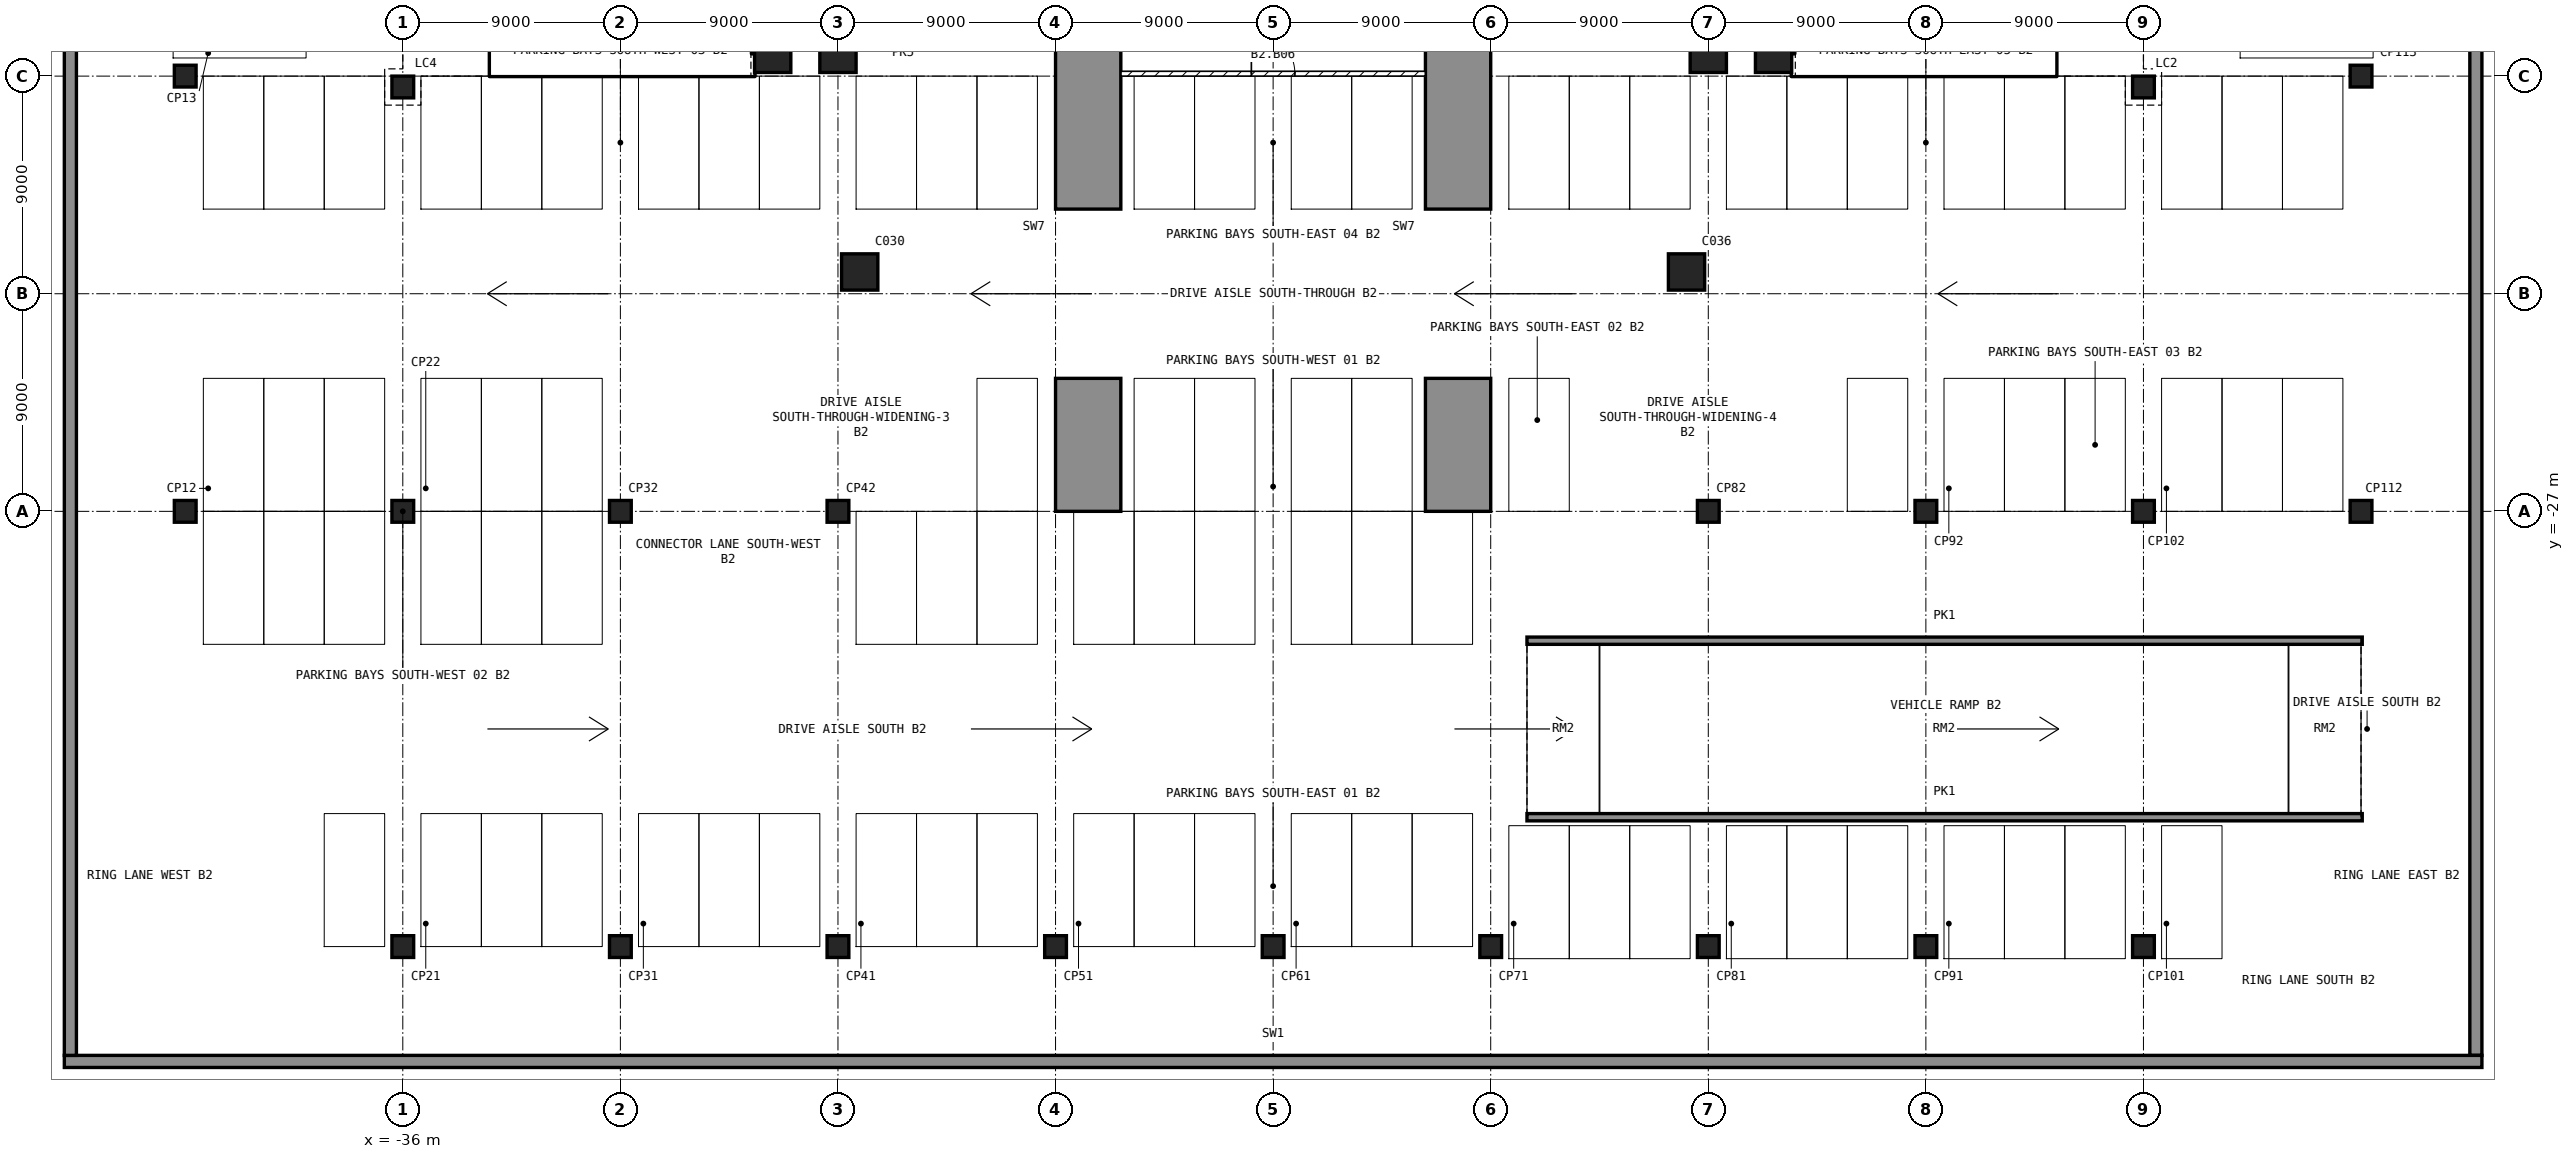
"""IFC4 building model, lengths in metres.
Left out: names, types, materials, properties, quantities, classifications, styles, units other than length and angle.
Written with IfcOpenShell. Run it as: python <this file> out.ifc"""

import sys

from ifc_helpers import new_model, si_unit, direction, frame, frame_2d, origin, origin_2d, place, context, subcontext, project, spatial, polyline, rectangle, outline, extrude, element, fill, save


model = new_model("IFC4")
c1 = context("Model", 3, precision=1e-05, world=origin(), true_north=direction((0.0, 1.0)))
c2 = subcontext(c1, "Body", "Model", "MODEL_VIEW")
j1 = project(units=[si_unit("LENGTHUNIT", "METRE"), si_unit("PLANEANGLEUNIT", "RADIAN")], contexts=[c1])
p1 = place(None, origin())
s1 = spatial("IfcSite", under=j1, at=p1, CompositionType="ELEMENT")
p2 = place(p1, origin())
s2 = spatial("IfcBuilding", under=s1, at=p2, CompositionType="ELEMENT")
p3 = place(p2, frame((0.0, 0.0, -8.7)))
s3 = spatial("IfcBuildingStorey", under=s2, at=p3, CompositionType="ELEMENT", Elevation=-8.7)
p4 = place(p3, frame((-50.0, -49.75, -0.3), z_axis=(0.0, 0.0, 1.0), x_axis=(1.0, 0.0, 0.0)))
e1 = element("IfcWall", 1, at=p4, inside=s3, PredefinedType="SOLIDWALL", context=c2, shape_type="SweptSolid", body=[
    extrude(rectangle(XDim=100.0, YDim=0.5, at=frame_2d((50.0, 0.0))), origin(), (0.0, 0.0, 1.0), 4.2),
])
for number, where, z_axis, x_axis in (
    (2, (49.75, -49.5, -0.3), (0.0, 0.0, 1.0), (0.0, 1.0, 0.0)),
    (3, (-49.75, -49.5, -0.3), (0.0, 0.0, 1.0), (0.0, 1.0, 0.0)),
):
    element("IfcWall", number, at=place(p3, frame(where, z_axis=z_axis, x_axis=x_axis)), inside=s3, PredefinedType="SOLIDWALL", context=c2, shape_type="SweptSolid", body=[
        extrude(rectangle(XDim=99.0, YDim=0.5, at=frame_2d((49.5, 0.0))), origin(), (0.0, 0.0, 1.0), 4.2),
    ])
for number, where, z_axis, x_axis in (
    (4, (-20.7, -8.1, -0.3), (0.0, 0.0, 1.0), (1.0, 0.0, 0.0)),
    (5, (-18.0, -8.1, -0.3), (0.0, 0.0, 1.0), (1.0, 0.0, 0.0)),
    (6, (18.0, -8.1, -0.3), (0.0, 0.0, 1.0), (1.0, 0.0, 0.0)),
    (7, (20.7, -8.1, -0.3), (0.0, 0.0, 1.0), (1.0, 0.0, 0.0)),
    (8, (-17.1, -17.1, -0.3), (0.0, 0.0, 1.0), (1.0, 0.0, 0.0)),
    (9, (17.1, -17.1, -0.3), (0.0, 0.0, 1.0), (1.0, 0.0, 0.0)),
):
    element("IfcColumn", number, at=place(p3, frame(where, z_axis=z_axis, x_axis=x_axis)), inside=s3, PredefinedType="COLUMN", context=c2, shape_type="SweptSolid", body=[
        extrude(rectangle(XDim=1.5, YDim=1.5, at=origin_2d()), origin(), (0.0, 0.0, 1.0), 4.2),
    ])
for number, where, z_axis, x_axis in (
    (10, (-45.0, -27.0, -0.3), (0.0, 0.0, 1.0), (1.0, 0.0, 0.0)),
    (11, (-45.0, -9.0, -0.3), (0.0, 0.0, 1.0), (1.0, 0.0, 0.0)),
    (12, (-36.0, -45.0, -0.3), (0.0, 0.0, 1.0), (1.0, 0.0, 0.0)),
    (13, (-36.0, -27.0, -0.3), (0.0, 0.0, 1.0), (1.0, 0.0, 0.0)),
    (14, (-27.0, -45.0, -0.3), (0.0, 0.0, 1.0), (1.0, 0.0, 0.0)),
    (15, (-27.0, -27.0, -0.3), (0.0, 0.0, 1.0), (1.0, 0.0, 0.0)),
    (16, (-18.0, -45.0, -0.3), (0.0, 0.0, 1.0), (1.0, 0.0, 0.0)),
    (17, (-18.0, -27.0, -0.3), (0.0, 0.0, 1.0), (1.0, 0.0, 0.0)),
    (18, (-9.0, -45.0, -0.3), (0.0, 0.0, 1.0), (1.0, 0.0, 0.0)),
    (19, (0.0, -45.0, -0.3), (0.0, 0.0, 1.0), (1.0, 0.0, 0.0)),
    (20, (9.0, -45.0, -0.3), (0.0, 0.0, 1.0), (1.0, 0.0, 0.0)),
    (21, (18.0, -45.0, -0.3), (0.0, 0.0, 1.0), (1.0, 0.0, 0.0)),
    (22, (18.0, -27.0, -0.3), (0.0, 0.0, 1.0), (1.0, 0.0, 0.0)),
    (23, (27.0, -45.0, -0.3), (0.0, 0.0, 1.0), (1.0, 0.0, 0.0)),
    (24, (27.0, -27.0, -0.3), (0.0, 0.0, 1.0), (1.0, 0.0, 0.0)),
    (25, (36.0, -45.0, -0.3), (0.0, 0.0, 1.0), (1.0, 0.0, 0.0)),
    (26, (36.0, -27.0, -0.3), (0.0, 0.0, 1.0), (1.0, 0.0, 0.0)),
    (27, (45.0, -27.0, -0.3), (0.0, 0.0, 1.0), (1.0, 0.0, 0.0)),
    (28, (45.0, -9.0, -0.3), (0.0, 0.0, 1.0), (1.0, 0.0, 0.0)),
    (29, (36.0, -9.45, -0.3), (0.0, 0.0, 1.0), (1.0, 0.0, 0.0)),
    (30, (-36.0, -9.45, -0.3), (0.0, 0.0, 1.0), (1.0, 0.0, 0.0)),
):
    element("IfcColumn", number, at=place(p3, frame(where, z_axis=z_axis, x_axis=x_axis)), inside=s3, PredefinedType="COLUMN", context=c2, shape_type="SweptSolid", body=[
        extrude(rectangle(XDim=0.9, YDim=0.9, at=origin_2d()), origin(), (0.0, 0.0, 1.0), 4.2),
    ])
for number, where, z_axis, x_axis in (
    (31, (6.3, -27.0, -0.3), (1.0, 0.0, 0.0), (0.0, 1.0, 0.0)),
    (32, (-9.0, -27.0, -0.3), (1.0, 0.0, 0.0), (0.0, 1.0, 0.0)),
):
    element("IfcWall", number, at=place(p3, frame(where, z_axis=z_axis, x_axis=x_axis)), inside=s3, PredefinedType="SOLIDWALL", context=c2, shape_type="SweptSolid", body=[
        extrude(outline(polyline([(0.0, 0.0), (5.5, 0.0), (5.5, 3.3), (12.5, 3.3), (12.5, 0.0), (23.5, 0.0), (23.5, 4.2), (0.0, 4.2), (0.0, 0.0)])), origin(), (0.0, 0.0, 1.0), 2.7),
    ])
p5 = place(p3, frame((21.45, -8.55, 0.0), z_axis=(0.0, 0.0, 1.0), x_axis=(1.0, 0.0, 0.0)))
e33 = element("IfcWall", 33, at=p5, inside=s3, PredefinedType="SHEAR", context=c2, shape_type="SweptSolid", body=[
    extrude(rectangle(XDim=10.95, YDim=0.9, at=frame_2d((5.475, 0.0))), origin(), (0.0, 0.0, 1.0), 3.9),
])
p6 = place(p3, frame((31.95, -8.1, 0.0), z_axis=(0.0, 0.0, 1.0), x_axis=(0.0, 1.0, 0.0)))
e34 = element("IfcWall", 34, at=p6, inside=s3, PredefinedType="SHEAR", context=c2, shape_type="SweptSolid", body=[
    extrude(rectangle(XDim=1.8, YDim=0.9, at=frame_2d((0.9, 0.0))), origin(), (0.0, 0.0, 1.0), 3.9),
])
p7 = place(p3, frame((21.825, -8.1, 0.0), z_axis=(0.0, 0.0, 1.0), x_axis=(0.0, 1.0, 0.0)))
e35 = element("IfcWall", 35, at=p7, inside=s3, PredefinedType="SHEAR", context=c2, shape_type="SweptSolid", body=[
    extrude(rectangle(XDim=6.9, YDim=0.45, at=frame_2d((3.45, 0.0))), origin(), (0.0, 0.0, 1.0), 3.9),
])
p8 = place(p3, frame((28.25, -8.1, 0.0), z_axis=(0.0, 0.0, 1.0), x_axis=(0.0, 1.0, 0.0)))
e36 = element("IfcWall", 36, at=p8, inside=s3, PredefinedType="SOLIDWALL", context=c2, shape_type="SweptSolid", body=[
    extrude(rectangle(XDim=2.85, YDim=0.2, at=frame_2d((1.425, 0.0))), origin(), (0.0, 0.0, 1.0), 3.9),
])
p9 = place(p3, frame((-32.4, -8.55, 0.0), z_axis=(0.0, 0.0, 1.0), x_axis=(1.0, 0.0, 0.0)))
e37 = element("IfcWall", 37, at=p9, inside=s3, PredefinedType="SHEAR", context=c2, shape_type="SweptSolid", body=[
    extrude(rectangle(XDim=10.95, YDim=0.9, at=frame_2d((5.475, 0.0))), origin(), (0.0, 0.0, 1.0), 3.9),
])
p10 = place(p3, frame((-31.95, -8.1, 0.0), z_axis=(0.0, 0.0, 1.0), x_axis=(0.0, 1.0, 0.0)))
e38 = element("IfcWall", 38, at=p10, inside=s3, PredefinedType="SHEAR", context=c2, shape_type="SweptSolid", body=[
    extrude(rectangle(XDim=1.8, YDim=0.9, at=frame_2d((0.9, 0.0))), origin(), (0.0, 0.0, 1.0), 3.9),
])
p11 = place(p3, frame((-21.825, -8.1, 0.0), z_axis=(0.0, 0.0, 1.0), x_axis=(0.0, 1.0, 0.0)))
e39 = element("IfcWall", 39, at=p11, inside=s3, PredefinedType="SHEAR", context=c2, shape_type="SweptSolid", body=[
    extrude(rectangle(XDim=6.9, YDim=0.45, at=frame_2d((3.45, 0.0))), origin(), (0.0, 0.0, 1.0), 3.9),
])
p12 = place(p3, frame((-28.25, -8.1, 0.0), z_axis=(0.0, 0.0, 1.0), x_axis=(0.0, 1.0, 0.0)))
e40 = element("IfcWall", 40, at=p12, inside=s3, PredefinedType="SOLIDWALL", context=c2, shape_type="SweptSolid", body=[
    extrude(rectangle(XDim=2.85, YDim=0.2, at=frame_2d((1.425, 0.0))), origin(), (0.0, 0.0, 1.0), 3.9),
])
for number, where, z_axis, x_axis in (
    (41, (10.5, -39.65, 0.0), (0.0, 0.0, 1.0), (1.0, 0.0, 0.0)),
    (42, (10.5, -32.35, 0.0), (0.0, 0.0, 1.0), (1.0, 0.0, 0.0)),
):
    element("IfcWall", number, at=place(p3, frame(where, z_axis=z_axis, x_axis=x_axis)), inside=s3, PredefinedType="SOLIDWALL", context=c2, shape_type="SweptSolid", body=[
        extrude(rectangle(XDim=34.55, YDim=0.3, at=frame_2d((17.275, 0.0))), origin(), (0.0, 0.0, 1.0), 4.2),
    ])
p13 = place(p3, frame((-6.3, -8.9, 0.0), z_axis=(0.0, 0.0, 1.0), x_axis=(1.0, 0.0, 0.0)))
e43 = element("IfcWall", 43, at=p13, inside=s3, PredefinedType="PARTITIONING", context=c2, shape_type="SweptSolid", body=[
    extrude(rectangle(XDim=12.6, YDim=0.2, at=frame_2d((6.3, 0.0))), origin(), (0.0, 0.0, 1.0), 3.9),
])
p14 = place(p13, frame((5.4, 0.0, 0.0)))
e44 = element("IfcOpeningElement", 44, at=p14, cuts=e43, PredefinedType="OPENING", context=c2, shape_type="SweptSolid", body=[
    extrude(rectangle(XDim=1.8, YDim=2.1, at=frame_2d((0.9, 1.05))), frame((0.0, 0.11, 0.0), z_axis=(0.0, -1.0, 0.0), x_axis=(1.0, 0.0, 0.0)), (0.0, 0.0, 1.0), 0.22),
])
p15 = place(p14, origin())
e45 = element("IfcDoor", 45, at=p15, inside=s3, OperationType="SINGLE_SWING_LEFT", PredefinedType="DOOR", context=c2, shape_type="SweptSolid", body=[
    extrude(rectangle(XDim=1.8, YDim=2.1, at=frame_2d((0.9, 1.05))), frame((0.0, 0.025, 0.0), z_axis=(0.0, -1.0, 0.0), x_axis=(1.0, 0.0, 0.0)), (0.0, 0.0, 1.0), 0.05),
])
fill(e44, e45)
save(model, sys.argv[1])
